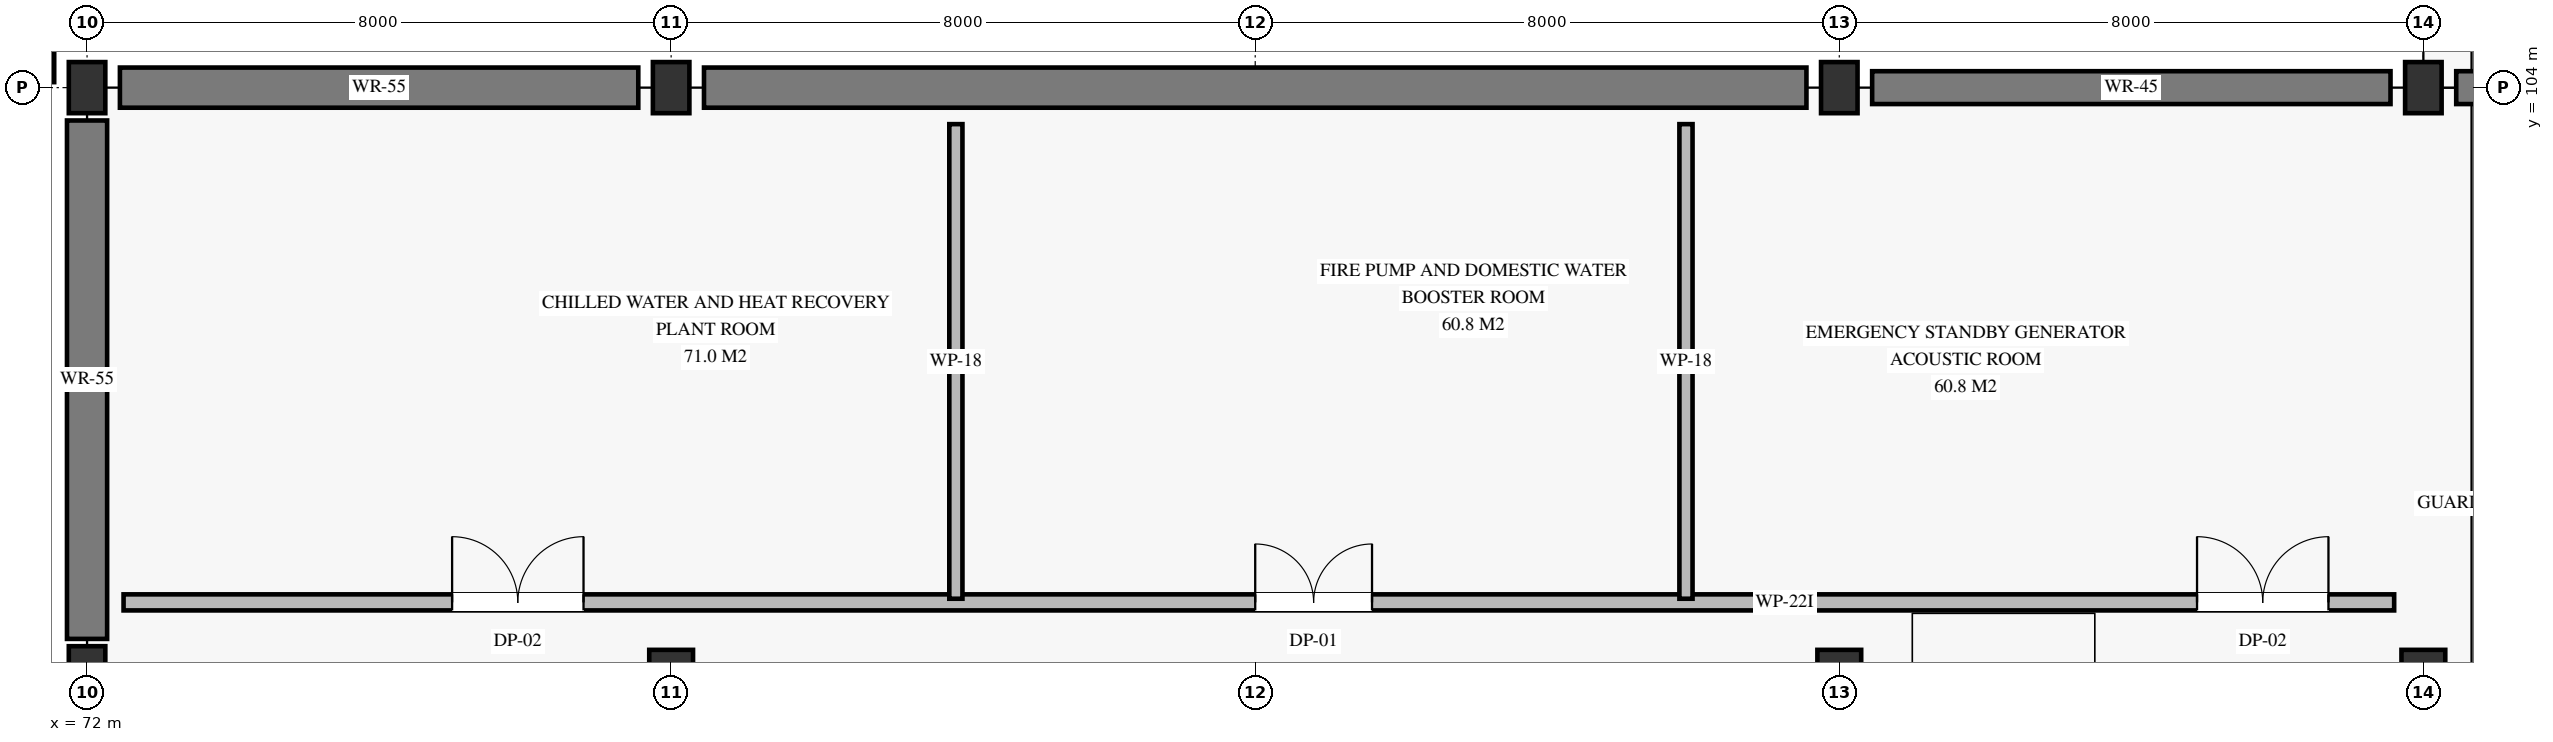
"""IFC4 building model, lengths in metres.
Left out: names, types, materials, properties, quantities, classifications, styles, units other than length and angle.
Written with IfcOpenShell. Run it as: python <this file> out.ifc"""

import sys

from ifc_helpers import new_model, si_unit, direction, frame, frame_2d, origin, origin_2d, place, context, subcontext, project, spatial, rectangle, extrude, element, fill, save


model = new_model("IFC4")
c1 = context("Model", 3, precision=1e-05, world=origin(), true_north=direction((0.0, 1.0)))
c2 = subcontext(c1, "Body", "Model", "MODEL_VIEW")
j1 = project(units=[si_unit("LENGTHUNIT", "METRE"), si_unit("PLANEANGLEUNIT", "RADIAN")], contexts=[c1])
p1 = place(None, origin())
s1 = spatial("IfcSite", under=j1, at=p1, CompositionType="ELEMENT")
p2 = place(p1, origin())
s2 = spatial("IfcBuilding", under=s1, at=p2, CompositionType="ELEMENT")
p3 = place(p2, frame((0.0, 0.0, -4.5)))
s3 = spatial("IfcBuildingStorey", under=s2, at=p3, CompositionType="ELEMENT", Elevation=-4.5)
for number, where, z_axis, x_axis in (
    (1, (72.0, 96.0, 0.0), (0.0, 0.0, 1.0), (1.0, 0.0, 0.0)),
    (2, (72.0, 104.0, 0.0), (0.0, 0.0, 1.0), (1.0, 0.0, 0.0)),
):
    element("IfcColumn", number, at=place(p3, frame(where, z_axis=z_axis, x_axis=x_axis)), inside=s3, PredefinedType="COLUMN", context=c2, shape_type="SweptSolid", body=[
        extrude(rectangle(XDim=0.5, YDim=0.7, at=origin_2d()), origin(), (0.0, 0.0, 1.0), 4.5),
    ])
p4 = place(p3, frame((80.0, 96.0, 0.0), z_axis=(0.0, 0.0, 1.0), x_axis=(1.0, 0.0, 0.0)))
e3 = element("IfcColumn", 3, at=p4, inside=s3, PredefinedType="COLUMN", context=c2, shape_type="SweptSolid", body=[
    extrude(rectangle(XDim=0.6, YDim=0.6, at=origin_2d()), origin(), (0.0, 0.0, 1.0), 4.5),
])
p5 = place(p3, frame((80.0, 104.0, 0.0), z_axis=(0.0, 0.0, 1.0), x_axis=(1.0, 0.0, 0.0)))
e4 = element("IfcColumn", 4, at=p5, inside=s3, PredefinedType="COLUMN", context=c2, shape_type="SweptSolid", body=[
    extrude(rectangle(XDim=0.5, YDim=0.7, at=origin_2d()), origin(), (0.0, 0.0, 1.0), 4.5),
])
p6 = place(p3, frame((96.0, 96.0, 0.0), z_axis=(0.0, 0.0, 1.0), x_axis=(1.0, 0.0, 0.0)))
e5 = element("IfcColumn", 5, at=p6, inside=s3, PredefinedType="COLUMN", context=c2, shape_type="SweptSolid", body=[
    extrude(rectangle(XDim=0.6, YDim=0.6, at=origin_2d()), origin(), (0.0, 0.0, 1.0), 4.5),
])
p7 = place(p3, frame((96.0, 104.0, 0.0), z_axis=(0.0, 0.0, 1.0), x_axis=(1.0, 0.0, 0.0)))
e6 = element("IfcColumn", 6, at=p7, inside=s3, PredefinedType="COLUMN", context=c2, shape_type="SweptSolid", body=[
    extrude(rectangle(XDim=0.5, YDim=0.7, at=origin_2d()), origin(), (0.0, 0.0, 1.0), 4.5),
])
p8 = place(p3, frame((104.0, 96.0, 0.0), z_axis=(0.0, 0.0, 1.0), x_axis=(1.0, 0.0, 0.0)))
e7 = element("IfcColumn", 7, at=p8, inside=s3, PredefinedType="COLUMN", context=c2, shape_type="SweptSolid", body=[
    extrude(rectangle(XDim=0.6, YDim=0.6, at=origin_2d()), origin(), (0.0, 0.0, 1.0), 4.5),
])
p9 = place(p3, frame((104.0, 104.0, 0.0), z_axis=(0.0, 0.0, 1.0), x_axis=(1.0, 0.0, 0.0)))
e8 = element("IfcColumn", 8, at=p9, inside=s3, PredefinedType="COLUMN", context=c2, shape_type="SweptSolid", body=[
    extrude(rectangle(XDim=0.5, YDim=0.7, at=origin_2d()), origin(), (0.0, 0.0, 1.0), 4.5),
])
p10 = place(p3, frame((72.45, 104.0, 0.0), z_axis=(0.0, 0.0, 1.0), x_axis=(1.0, 0.0, 0.0)))
e9 = element("IfcWall", 9, at=p10, inside=s3, PredefinedType="USERDEFINED", context=c2, shape_type="SweptSolid", body=[
    extrude(rectangle(XDim=7.1, YDim=0.55, at=frame_2d((3.55, 0.0))), origin(), (0.0, 0.0, 1.0), 4.18),
])
p11 = place(p3, frame((80.45, 104.0, 0.0), z_axis=(0.0, 0.0, 1.0), x_axis=(1.0, 0.0, 0.0)))
e10 = element("IfcWall", 10, at=p11, inside=s3, PredefinedType="USERDEFINED", context=c2, shape_type="SweptSolid", body=[
    extrude(rectangle(XDim=15.1, YDim=0.55, at=frame_2d((7.55, 0.0))), origin(), (0.0, 0.0, 1.0), 4.18),
])
for number, where, z_axis, x_axis in (
    (11, (96.45, 104.0, 0.0), (0.0, 0.0, 1.0), (1.0, 0.0, 0.0)),
    (12, (104.45, 104.0, 0.0), (0.0, 0.0, 1.0), (1.0, 0.0, 0.0)),
):
    element("IfcWall", number, at=place(p3, frame(where, z_axis=z_axis, x_axis=x_axis)), inside=s3, PredefinedType="USERDEFINED", context=c2, shape_type="SweptSolid", body=[
        extrude(rectangle(XDim=7.1, YDim=0.45, at=frame_2d((3.55, 0.0))), origin(), (0.0, 0.0, 1.0), 4.18),
    ])
p12 = place(p3, frame((72.0, 103.55, 0.0), z_axis=(0.0, 0.0, 1.0), x_axis=(0.0, -1.0, 0.0)))
e13 = element("IfcWall", 13, at=p12, inside=s3, PredefinedType="USERDEFINED", context=c2, shape_type="SweptSolid", body=[
    extrude(rectangle(XDim=7.1, YDim=0.55, at=frame_2d((3.55, 0.0))), origin(), (0.0, 0.0, 1.0), 4.18),
])
p13 = place(p3, frame((68.3, 104.3, 0.0), z_axis=(0.0, 0.0, 1.0), x_axis=(1.0, 0.0, 0.0)))
e14 = element("IfcWall", 14, at=p13, inside=s3, PredefinedType="USERDEFINED", context=c2, shape_type="SweptSolid", body=[
    extrude(rectangle(XDim=3.25, YDim=0.45, at=frame_2d((1.625, 0.0))), origin(), (0.0, 0.0, 1.0), 4.26),
])
p14 = place(p3, frame((72.5, 96.95, 0.0), z_axis=(0.0, 0.0, 1.0), x_axis=(1.0, 0.0, 0.0)))
e15 = element("IfcWall", 15, at=p14, inside=s3, PredefinedType="PARTITIONING", context=c2, shape_type="SweptSolid", body=[
    extrude(rectangle(XDim=31.1, YDim=0.22, at=frame_2d((15.55, 0.0))), origin(), (0.0, 0.0, 1.0), 3.392),
])
p15 = place(p14, frame((4.5, 0.0, 0.0)))
e16 = element("IfcOpeningElement", 16, at=p15, cuts=e15, PredefinedType="OPENING", context=c2, shape_type="SweptSolid", body=[
    extrude(rectangle(XDim=1.8, YDim=2.5, at=frame_2d((0.9, 1.25))), frame((0.0, 0.12, 0.0), z_axis=(0.0, -1.0, 0.0), x_axis=(1.0, 0.0, 0.0)), (0.0, 0.0, 1.0), 0.24),
])
p16 = place(p14, frame((15.5, 0.0, 0.0)))
e17 = element("IfcOpeningElement", 17, at=p16, cuts=e15, PredefinedType="OPENING", context=c2, shape_type="SweptSolid", body=[
    extrude(rectangle(XDim=1.6, YDim=2.4, at=frame_2d((0.8, 1.2))), frame((0.0, 0.12, 0.0), z_axis=(0.0, -1.0, 0.0), x_axis=(1.0, 0.0, 0.0)), (0.0, 0.0, 1.0), 0.24),
])
p17 = place(p14, frame((28.4, 0.0, 0.0)))
e18 = element("IfcOpeningElement", 18, at=p17, cuts=e15, PredefinedType="OPENING", context=c2, shape_type="SweptSolid", body=[
    extrude(rectangle(XDim=1.8, YDim=2.5, at=frame_2d((0.9, 1.25))), frame((0.0, 0.12, 0.0), z_axis=(0.0, -1.0, 0.0), x_axis=(1.0, 0.0, 0.0)), (0.0, 0.0, 1.0), 0.24),
])
for number, where, z_axis, x_axis in (
    (19, (83.9, 97.0, 0.0), (0.0, 0.0, 1.0), (0.0, 1.0, 0.0)),
    (20, (93.9, 97.0, 0.0), (0.0, 0.0, 1.0), (0.0, 1.0, 0.0)),
):
    element("IfcWall", number, at=place(p3, frame(where, z_axis=z_axis, x_axis=x_axis)), inside=s3, PredefinedType="PARTITIONING", context=c2, shape_type="SweptSolid", body=[
        extrude(rectangle(XDim=6.5, YDim=0.18, at=frame_2d((3.25, 0.0))), origin(), (0.0, 0.0, 1.0), 3.642),
    ])
p18 = place(p15, origin())
e21 = element("IfcDoor", 21, at=p18, inside=s3, OperationType="DOUBLE_DOOR_SINGLE_SWING", PredefinedType="DOOR", context=c2, shape_type="SweptSolid", body=[
    extrude(rectangle(XDim=1.8, YDim=2.5, at=frame_2d((0.9, 1.25))), frame((0.0, 0.025, 0.0), z_axis=(0.0, -1.0, 0.0), x_axis=(1.0, 0.0, 0.0)), (0.0, 0.0, 1.0), 0.05),
])
fill(e16, e21)
p19 = place(p16, origin())
e22 = element("IfcDoor", 22, at=p19, inside=s3, OperationType="DOUBLE_DOOR_SINGLE_SWING", PredefinedType="DOOR", context=c2, shape_type="SweptSolid", body=[
    extrude(rectangle(XDim=1.6, YDim=2.4, at=frame_2d((0.8, 1.2))), frame((0.0, 0.025, 0.0), z_axis=(0.0, -1.0, 0.0), x_axis=(1.0, 0.0, 0.0)), (0.0, 0.0, 1.0), 0.05),
])
fill(e17, e22)
p20 = place(p17, origin())
e23 = element("IfcDoor", 23, at=p20, inside=s3, OperationType="DOUBLE_DOOR_SINGLE_SWING", PredefinedType="DOOR", context=c2, shape_type="SweptSolid", body=[
    extrude(rectangle(XDim=1.8, YDim=2.5, at=frame_2d((0.9, 1.25))), frame((0.0, 0.025, 0.0), z_axis=(0.0, -1.0, 0.0), x_axis=(1.0, 0.0, 0.0)), (0.0, 0.0, 1.0), 0.05),
])
fill(e18, e23)
save(model, sys.argv[1])
